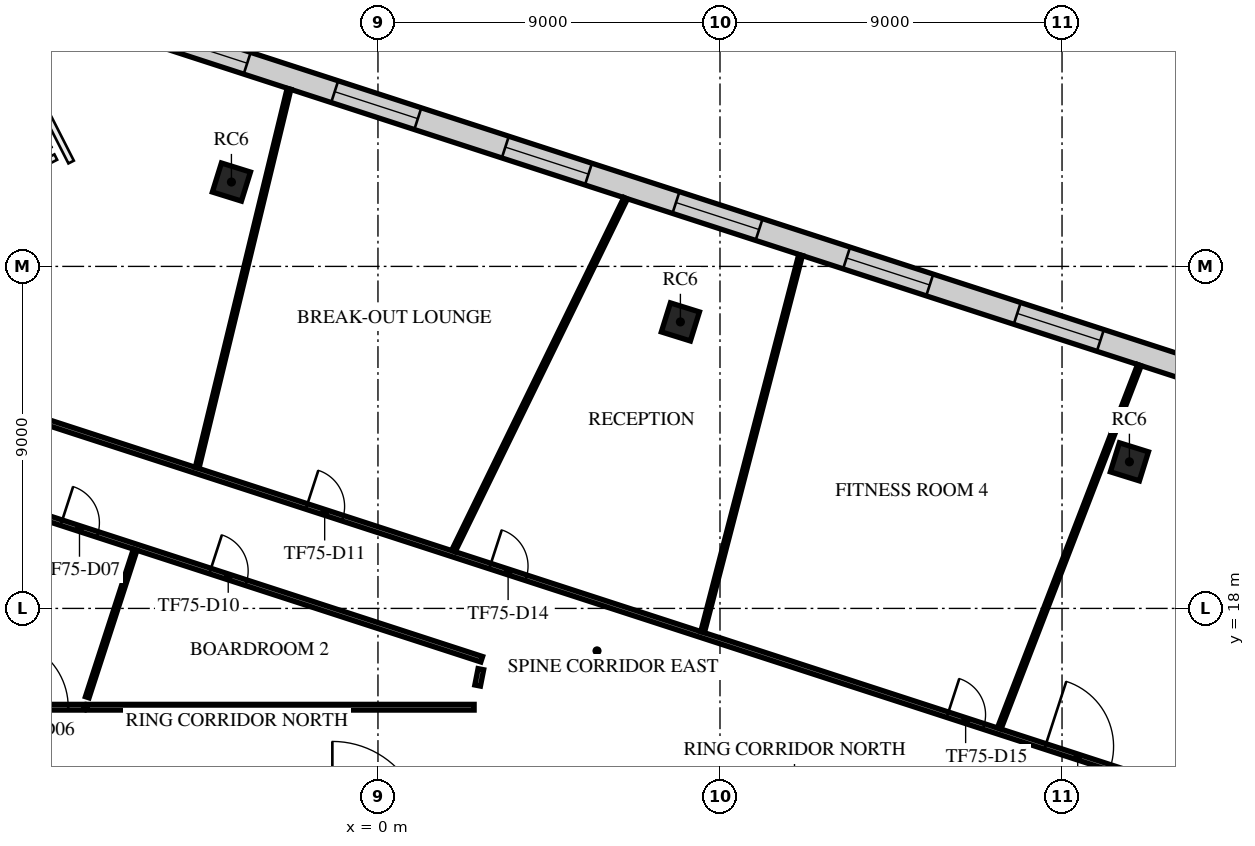
"""IFC4 building model, lengths in metres.
Left out: names, types, materials, properties, quantities, classifications, styles, units other than length and angle.
Written with IfcOpenShell. Run it as: python <this file> out.ifc"""

import sys

from ifc_helpers import new_model, si_unit, direction, frame, frame_2d, origin, origin_2d, place, context, subcontext, project, spatial, rectangle, extrude, element, fill, save


model = new_model("IFC4")
c1 = context("Model", 3, precision=1e-05, world=origin(), true_north=direction((0.0, 1.0)))
c2 = subcontext(c1, "Body", "Model", "MODEL_VIEW")
j1 = project(units=[si_unit("LENGTHUNIT", "METRE"), si_unit("PLANEANGLEUNIT", "RADIAN")], contexts=[c1])
p1 = place(None, origin())
s1 = spatial("IfcSite", under=j1, at=p1, CompositionType="ELEMENT")
p2 = place(p1, origin())
s2 = spatial("IfcBuilding", under=s1, at=p2, CompositionType="ELEMENT")
p3 = place(p2, frame((0.0, 0.0, 316.5)))
s3 = spatial("IfcBuildingStorey", under=s2, at=p3, CompositionType="ELEMENT", Elevation=316.5)
for number, where, z_axis, x_axis in (
    (1, (19.773, 21.857, 0.0), (0.0, 0.0, 1.0), (0.298, 0.955, 0.0)),
    (2, (7.958, 25.539, 0.0), (0.0, 0.0, 1.0), (0.298, 0.955, 0.0)),
    (3, (-3.856, 29.22, 0.0), (0.0, 0.0, 1.0), (0.298, 0.955, 0.0)),
):
    element("IfcColumn", number, at=place(p3, frame(where, z_axis=z_axis, x_axis=x_axis)), inside=s3, PredefinedType="COLUMN", context=c2, shape_type="SweptSolid", body=[
        extrude(rectangle(XDim=0.8, YDim=0.8, at=origin_2d()), origin(), (0.0, 0.0, 1.0), 4.0),
    ])
p4 = place(p3, frame((17.98, -31.066, 0.0), z_axis=(0.0, 0.0, 1.0), x_axis=(0.30901795675, 0.9510562036, 0.0)))
e4 = element("IfcWall", 4, at=p4, inside=s3, PredefinedType="STANDARD", context=c2, shape_type="SweptSolid", body=[
    extrude(rectangle(XDim=47.979, YDim=0.6, at=frame_2d((23.99, 0.0))), origin(), (0.0, 0.0, 1.0), 3.65),
])
p5 = place(p4, frame((1.231, 0.0, 0.9)))
e5 = element("IfcOpeningElement", 5, at=p5, cuts=e4, PredefinedType="OPENING", context=c2, shape_type="SweptSolid", body=[
    extrude(rectangle(XDim=1.9, YDim=2.1, at=frame_2d((0.95, 1.05))), frame((0.0, 0.31, 0.0), z_axis=(0.0, -1.0, 0.0), x_axis=(1.0, 0.0, 0.0)), (0.0, 0.0, 1.0), 0.62),
])
p6 = place(p4, frame((5.593, 0.0, 0.9)))
e6 = element("IfcOpeningElement", 6, at=p6, cuts=e4, PredefinedType="OPENING", context=c2, shape_type="SweptSolid", body=[
    extrude(rectangle(XDim=1.9, YDim=2.1, at=frame_2d((0.95, 1.05))), frame((0.0, 0.31, 0.0), z_axis=(0.0, -1.0, 0.0), x_axis=(1.0, 0.0, 0.0)), (0.0, 0.0, 1.0), 0.62),
])
p7 = place(p4, frame((9.954, 0.0, 0.9)))
e7 = element("IfcOpeningElement", 7, at=p7, cuts=e4, PredefinedType="OPENING", context=c2, shape_type="SweptSolid", body=[
    extrude(rectangle(XDim=1.9, YDim=2.1, at=frame_2d((0.95, 1.05))), frame((0.0, 0.31, 0.0), z_axis=(0.0, -1.0, 0.0), x_axis=(1.0, 0.0, 0.0)), (0.0, 0.0, 1.0), 0.62),
])
p8 = place(p4, frame((14.316, 0.0, 0.9)))
e8 = element("IfcOpeningElement", 8, at=p8, cuts=e4, PredefinedType="OPENING", context=c2, shape_type="SweptSolid", body=[
    extrude(rectangle(XDim=1.9, YDim=2.1, at=frame_2d((0.95, 1.05))), frame((0.0, 0.31, 0.0), z_axis=(0.0, -1.0, 0.0), x_axis=(1.0, 0.0, 0.0)), (0.0, 0.0, 1.0), 0.62),
])
p9 = place(p4, frame((18.678, 0.0, 0.9)))
e9 = element("IfcOpeningElement", 9, at=p9, cuts=e4, PredefinedType="OPENING", context=c2, shape_type="SweptSolid", body=[
    extrude(rectangle(XDim=1.9, YDim=2.1, at=frame_2d((0.95, 1.05))), frame((0.0, 0.31, 0.0), z_axis=(0.0, -1.0, 0.0), x_axis=(1.0, 0.0, 0.0)), (0.0, 0.0, 1.0), 0.62),
])
p10 = place(p4, frame((23.04, 0.0, 0.9)))
e10 = element("IfcOpeningElement", 10, at=p10, cuts=e4, PredefinedType="OPENING", context=c2, shape_type="SweptSolid", body=[
    extrude(rectangle(XDim=1.9, YDim=2.1, at=frame_2d((0.95, 1.05))), frame((0.0, 0.31, 0.0), z_axis=(0.0, -1.0, 0.0), x_axis=(1.0, 0.0, 0.0)), (0.0, 0.0, 1.0), 0.62),
])
p11 = place(p4, frame((27.401, 0.0, 0.9)))
e11 = element("IfcOpeningElement", 11, at=p11, cuts=e4, PredefinedType="OPENING", context=c2, shape_type="SweptSolid", body=[
    extrude(rectangle(XDim=1.9, YDim=2.1, at=frame_2d((0.95, 1.05))), frame((0.0, 0.31, 0.0), z_axis=(0.0, -1.0, 0.0), x_axis=(1.0, 0.0, 0.0)), (0.0, 0.0, 1.0), 0.62),
])
p12 = place(p4, frame((31.763, 0.0, 0.9)))
e12 = element("IfcOpeningElement", 12, at=p12, cuts=e4, PredefinedType="OPENING", context=c2, shape_type="SweptSolid", body=[
    extrude(rectangle(XDim=1.9, YDim=2.1, at=frame_2d((0.95, 1.05))), frame((0.0, 0.31, 0.0), z_axis=(0.0, -1.0, 0.0), x_axis=(1.0, 0.0, 0.0)), (0.0, 0.0, 1.0), 0.62),
])
p13 = place(p4, frame((36.125, 0.0, 0.9)))
e13 = element("IfcOpeningElement", 13, at=p13, cuts=e4, PredefinedType="OPENING", context=c2, shape_type="SweptSolid", body=[
    extrude(rectangle(XDim=1.9, YDim=2.1, at=frame_2d((0.95, 1.05))), frame((0.0, 0.31, 0.0), z_axis=(0.0, -1.0, 0.0), x_axis=(1.0, 0.0, 0.0)), (0.0, 0.0, 1.0), 0.62),
])
p14 = place(p4, frame((40.487, 0.0, 0.9)))
e14 = element("IfcOpeningElement", 14, at=p14, cuts=e4, PredefinedType="OPENING", context=c2, shape_type="SweptSolid", body=[
    extrude(rectangle(XDim=1.9, YDim=2.1, at=frame_2d((0.95, 1.05))), frame((0.0, 0.31, 0.0), z_axis=(0.0, -1.0, 0.0), x_axis=(1.0, 0.0, 0.0)), (0.0, 0.0, 1.0), 0.62),
])
p15 = place(p4, frame((44.848, 0.0, 0.9)))
e15 = element("IfcOpeningElement", 15, at=p15, cuts=e4, PredefinedType="OPENING", context=c2, shape_type="SweptSolid", body=[
    extrude(rectangle(XDim=1.9, YDim=2.1, at=frame_2d((0.95, 1.05))), frame((0.0, 0.31, 0.0), z_axis=(0.0, -1.0, 0.0), x_axis=(1.0, 0.0, 0.0)), (0.0, 0.0, 1.0), 0.62),
])
p16 = place(p3, frame((29.14, 21.76, 0.0), z_axis=(0.0, 0.0, 1.0), x_axis=(-0.951057712071, 0.309013314132, 0.0)))
e16 = element("IfcWall", 16, at=p16, inside=s3, PredefinedType="STANDARD", context=c2, shape_type="SweptSolid", body=[
    extrude(rectangle(XDim=42.49, YDim=0.6, at=frame_2d((21.245, 0.0))), origin(), (0.0, 0.0, 1.0), 3.65),
])
p17 = place(p16, frame((1.21, 0.0, 0.9)))
e17 = element("IfcOpeningElement", 17, at=p17, cuts=e16, PredefinedType="OPENING", context=c2, shape_type="SweptSolid", body=[
    extrude(rectangle(XDim=2.3, YDim=2.1, at=frame_2d((1.15, 1.05))), frame((0.0, 0.31, 0.0), z_axis=(0.0, -1.0, 0.0), x_axis=(1.0, 0.0, 0.0)), (0.0, 0.0, 1.0), 0.62),
])
p18 = place(p16, frame((5.932, 0.0, 0.9)))
e18 = element("IfcOpeningElement", 18, at=p18, cuts=e16, PredefinedType="OPENING", context=c2, shape_type="SweptSolid", body=[
    extrude(rectangle(XDim=2.3, YDim=2.1, at=frame_2d((1.15, 1.05))), frame((0.0, 0.31, 0.0), z_axis=(0.0, -1.0, 0.0), x_axis=(1.0, 0.0, 0.0)), (0.0, 0.0, 1.0), 0.62),
])
p19 = place(p16, frame((10.653, 0.0, 0.9)))
e19 = element("IfcOpeningElement", 19, at=p19, cuts=e16, PredefinedType="OPENING", context=c2, shape_type="SweptSolid", body=[
    extrude(rectangle(XDim=2.3, YDim=2.1, at=frame_2d((1.15, 1.05))), frame((0.0, 0.31, 0.0), z_axis=(0.0, -1.0, 0.0), x_axis=(1.0, 0.0, 0.0)), (0.0, 0.0, 1.0), 0.62),
])
p20 = place(p16, frame((15.374, 0.0, 0.9)))
e20 = element("IfcOpeningElement", 20, at=p20, cuts=e16, PredefinedType="OPENING", context=c2, shape_type="SweptSolid", body=[
    extrude(rectangle(XDim=2.3, YDim=2.1, at=frame_2d((1.15, 1.05))), frame((0.0, 0.31, 0.0), z_axis=(0.0, -1.0, 0.0), x_axis=(1.0, 0.0, 0.0)), (0.0, 0.0, 1.0), 0.62),
])
p21 = place(p16, frame((20.095, 0.0, 0.9)))
e21 = element("IfcOpeningElement", 21, at=p21, cuts=e16, PredefinedType="OPENING", context=c2, shape_type="SweptSolid", body=[
    extrude(rectangle(XDim=2.3, YDim=2.1, at=frame_2d((1.15, 1.05))), frame((0.0, 0.31, 0.0), z_axis=(0.0, -1.0, 0.0), x_axis=(1.0, 0.0, 0.0)), (0.0, 0.0, 1.0), 0.62),
])
p22 = place(p16, frame((24.816, 0.0, 0.9)))
e22 = element("IfcOpeningElement", 22, at=p22, cuts=e16, PredefinedType="OPENING", context=c2, shape_type="SweptSolid", body=[
    extrude(rectangle(XDim=2.3, YDim=2.1, at=frame_2d((1.15, 1.05))), frame((0.0, 0.31, 0.0), z_axis=(0.0, -1.0, 0.0), x_axis=(1.0, 0.0, 0.0)), (0.0, 0.0, 1.0), 0.62),
])
p23 = place(p16, frame((29.537, 0.0, 0.9)))
e23 = element("IfcOpeningElement", 23, at=p23, cuts=e16, PredefinedType="OPENING", context=c2, shape_type="SweptSolid", body=[
    extrude(rectangle(XDim=2.3, YDim=2.1, at=frame_2d((1.15, 1.05))), frame((0.0, 0.31, 0.0), z_axis=(0.0, -1.0, 0.0), x_axis=(1.0, 0.0, 0.0)), (0.0, 0.0, 1.0), 0.62),
])
p24 = place(p16, frame((34.258, 0.0, 0.9)))
e24 = element("IfcOpeningElement", 24, at=p24, cuts=e16, PredefinedType="OPENING", context=c2, shape_type="SweptSolid", body=[
    extrude(rectangle(XDim=2.3, YDim=2.1, at=frame_2d((1.15, 1.05))), frame((0.0, 0.31, 0.0), z_axis=(0.0, -1.0, 0.0), x_axis=(1.0, 0.0, 0.0)), (0.0, 0.0, 1.0), 0.62),
])
p25 = place(p16, frame((38.979, 0.0, 0.9)))
e25 = element("IfcOpeningElement", 25, at=p25, cuts=e16, PredefinedType="OPENING", context=c2, shape_type="SweptSolid", body=[
    extrude(rectangle(XDim=2.3, YDim=2.1, at=frame_2d((1.15, 1.05))), frame((0.0, 0.31, 0.0), z_axis=(0.0, -1.0, 0.0), x_axis=(1.0, 0.0, 0.0)), (0.0, 0.0, 1.0), 0.62),
])
p26 = place(p3, frame((-14.25, 15.4, 0.0), z_axis=(0.0, 0.0, 1.0), x_axis=(1.0, 0.0, 0.0)))
e26 = element("IfcWall", 26, at=p26, inside=s3, PredefinedType="PARTITIONING", context=c2, shape_type="SweptSolid", body=[
    extrude(rectangle(XDim=6.515, YDim=0.15, at=frame_2d((3.258, 0.0))), origin(), (0.0, 0.0, 1.0), 3.25),
])
p27 = place(p26, frame((4.3, 0.0, 0.0)))
e27 = element("IfcOpeningElement", 27, at=p27, cuts=e26, PredefinedType="OPENING", context=c2, shape_type="SweptSolid", body=[
    extrude(rectangle(XDim=1.8, YDim=2.1, at=frame_2d((0.9, 1.05))), frame((0.0, 0.085, 0.0), z_axis=(0.0, -1.0, 0.0), x_axis=(1.0, 0.0, 0.0)), (0.0, 0.0, 1.0), 0.17),
])
p28 = place(p3, frame((-11.706, 21.352, 0.0), z_axis=(0.0, 0.0, 1.0), x_axis=(0.951071532065, -0.308970776767, 0.0)))
e28 = element("IfcWall", 28, at=p28, inside=s3, PredefinedType="PARTITIONING", context=c2, shape_type="SweptSolid", body=[
    extrude(rectangle(XDim=15.178, YDim=0.15, at=frame_2d((7.589, 0.0))), origin(), (0.0, 0.0, 1.0), 3.25),
])
p29 = place(p28, frame((3.55, 0.0, 0.0)))
e29 = element("IfcOpeningElement", 29, at=p29, cuts=e28, PredefinedType="OPENING", context=c2, shape_type="SweptSolid", body=[
    extrude(rectangle(XDim=1.0, YDim=2.1, at=frame_2d((0.5, 1.05))), frame((0.0, 0.085, 0.0), z_axis=(0.0, -1.0, 0.0), x_axis=(1.0, 0.0, 0.0)), (0.0, 0.0, 1.0), 0.17),
])
p30 = place(p28, frame((7.665, 0.0, 0.0)))
e30 = element("IfcOpeningElement", 30, at=p30, cuts=e28, PredefinedType="OPENING", context=c2, shape_type="SweptSolid", body=[
    extrude(rectangle(XDim=1.0, YDim=2.1, at=frame_2d((0.5, 1.05))), frame((0.0, 0.085, 0.0), z_axis=(0.0, -1.0, 0.0), x_axis=(1.0, 0.0, 0.0)), (0.0, 0.0, 1.0), 0.17),
])
p31 = place(p3, frame((-10.964, 23.635, 0.0), z_axis=(0.0, 0.0, 1.0), x_axis=(0.951055018443, -0.309021604252, 0.0)))
e31 = element("IfcWall", 31, at=p31, inside=s3, PredefinedType="PARTITIONING", context=c2, shape_type="SweptSolid", body=[
    extrude(rectangle(XDim=35.537, YDim=0.15, at=frame_2d((17.769, 0.0))), origin(), (0.0, 0.0, 1.0), 3.25),
])
p32 = place(p31, frame((9.554, 0.0, 0.0)))
e32 = element("IfcOpeningElement", 32, at=p32, cuts=e31, PredefinedType="OPENING", context=c2, shape_type="SweptSolid", body=[
    extrude(rectangle(XDim=1.0, YDim=2.1, at=frame_2d((0.5, 1.05))), frame((0.0, 0.085, 0.0), z_axis=(0.0, -1.0, 0.0), x_axis=(1.0, 0.0, 0.0)), (0.0, 0.0, 1.0), 0.17),
])
p33 = place(p31, frame((14.629, 0.0, 0.0)))
e33 = element("IfcOpeningElement", 33, at=p33, cuts=e31, PredefinedType="OPENING", context=c2, shape_type="SweptSolid", body=[
    extrude(rectangle(XDim=1.0, YDim=2.1, at=frame_2d((0.5, 1.05))), frame((0.0, 0.085, 0.0), z_axis=(0.0, -1.0, 0.0), x_axis=(1.0, 0.0, 0.0)), (0.0, 0.0, 1.0), 0.17),
])
p34 = place(p31, frame((27.287, 0.0, 0.0)))
e34 = element("IfcOpeningElement", 34, at=p34, cuts=e31, PredefinedType="OPENING", context=c2, shape_type="SweptSolid", body=[
    extrude(rectangle(XDim=1.0, YDim=2.1, at=frame_2d((0.5, 1.05))), frame((0.0, 0.085, 0.0), z_axis=(0.0, -1.0, 0.0), x_axis=(1.0, 0.0, 0.0)), (0.0, 0.0, 1.0), 0.17),
])
p35 = place(p31, frame((29.988, 0.0, 0.0)))
e35 = element("IfcOpeningElement", 35, at=p35, cuts=e31, PredefinedType="OPENING", context=c2, shape_type="SweptSolid", body=[
    extrude(rectangle(XDim=1.8, YDim=2.1, at=frame_2d((0.9, 1.05))), frame((0.0, 0.085, 0.0), z_axis=(0.0, -1.0, 0.0), x_axis=(1.0, 0.0, 0.0)), (0.0, 0.0, 1.0), 0.17),
])
p36 = place(p3, frame((-7.65, 15.4, 0.0), z_axis=(0.0, 0.0, 1.0), x_axis=(1.0, 0.0, 0.0)))
e36 = element("IfcWall", 36, at=p36, inside=s3, PredefinedType="PARTITIONING", context=c2, shape_type="SweptSolid", body=[
    extrude(rectangle(XDim=10.18, YDim=0.15, at=frame_2d((5.09, 0.0))), origin(), (0.0, 0.0, 1.0), 3.25),
])
p37 = place(p3, frame((2.708, 16.4, 0.0), z_axis=(0.0, 0.0, 1.0), x_axis=(-0.193004252624, -0.981197920131, 0.0)))
e37 = element("IfcWall", 37, at=p37, inside=s3, PredefinedType="PARTITIONING", context=c2, shape_type="SweptSolid", body=[
    extrude(rectangle(XDim=0.438, YDim=0.15, at=frame_2d((0.219, 0.0))), origin(), (0.0, 0.0, 1.0), 3.25),
])
p38 = place(p3, frame((-7.65, 15.662, 0.0), z_axis=(0.0, 0.0, 1.0), x_axis=(0.308990083735, 0.951065259671, 0.0)))
e38 = element("IfcWall", 38, at=p38, inside=s3, PredefinedType="PARTITIONING", context=c2, shape_type="SweptSolid", body=[
    extrude(rectangle(XDim=4.083, YDim=0.1, at=frame_2d((2.042, 0.0))), origin(), (0.0, 0.0, 1.0), 3.25),
])
p39 = place(p3, frame((-4.757, 21.701, 0.0), z_axis=(0.0, 0.0, 1.0), x_axis=(0.235614328577, 0.971846638194, 0.0)))
e39 = element("IfcWall", 39, at=p39, inside=s3, PredefinedType="PARTITIONING", context=c2, shape_type="SweptSolid", body=[
    extrude(rectangle(XDim=10.259, YDim=0.1, at=frame_2d((5.13, 0.0))), origin(), (0.0, 0.0, 1.0), 3.05),
])
p40 = place(p3, frame((1.987, 19.513, 0.0), z_axis=(0.0, 0.0, 1.0), x_axis=(0.438663040854, 0.898651621369, 0.0)))
e40 = element("IfcWall", 40, at=p40, inside=s3, PredefinedType="PARTITIONING", context=c2, shape_type="SweptSolid", body=[
    extrude(rectangle(XDim=10.326, YDim=0.1, at=frame_2d((5.163, 0.0))), origin(), (0.0, 0.0, 1.0), 3.05),
])
p41 = place(p3, frame((8.543, 17.379, 0.0), z_axis=(0.0, 0.0, 1.0), x_axis=(0.251516032517, 0.967853132137, 0.0)))
e41 = element("IfcWall", 41, at=p41, inside=s3, PredefinedType="PARTITIONING", context=c2, shape_type="SweptSolid", body=[
    extrude(rectangle(XDim=10.248, YDim=0.1, at=frame_2d((5.124, 0.0))), origin(), (0.0, 0.0, 1.0), 3.05),
])
p42 = place(p3, frame((16.348, 14.843, 0.0), z_axis=(0.0, 0.0, 1.0), x_axis=(0.360002455437, 0.932951355687, 0.0)))
e42 = element("IfcWall", 42, at=p42, inside=s3, PredefinedType="PARTITIONING", context=c2, shape_type="SweptSolid", body=[
    extrude(rectangle(XDim=10.245, YDim=0.1, at=frame_2d((5.123, 0.0))), origin(), (0.0, 0.0, 1.0), 3.05),
])
p43 = place(p19, origin())
e43 = element("IfcWindow", 43, at=p43, inside=s3, PartitioningType="SINGLE_PANEL", PredefinedType="WINDOW", context=c2, shape_type="SweptSolid", body=[
    extrude(rectangle(XDim=2.3, YDim=2.1, at=frame_2d((1.15, 1.05))), frame((0.0, 0.03, 0.0), z_axis=(0.0, -1.0, 0.0), x_axis=(1.0, 0.0, 0.0)), (0.0, 0.0, 1.0), 0.06),
])
fill(e19, e43)
p44 = place(p20, origin())
e44 = element("IfcWindow", 44, at=p44, inside=s3, PartitioningType="SINGLE_PANEL", PredefinedType="WINDOW", context=c2, shape_type="SweptSolid", body=[
    extrude(rectangle(XDim=2.3, YDim=2.1, at=frame_2d((1.15, 1.05))), frame((0.0, 0.03, 0.0), z_axis=(0.0, -1.0, 0.0), x_axis=(1.0, 0.0, 0.0)), (0.0, 0.0, 1.0), 0.06),
])
fill(e20, e44)
p45 = place(p21, origin())
e45 = element("IfcWindow", 45, at=p45, inside=s3, PartitioningType="SINGLE_PANEL", PredefinedType="WINDOW", context=c2, shape_type="SweptSolid", body=[
    extrude(rectangle(XDim=2.3, YDim=2.1, at=frame_2d((1.15, 1.05))), frame((0.0, 0.03, 0.0), z_axis=(0.0, -1.0, 0.0), x_axis=(1.0, 0.0, 0.0)), (0.0, 0.0, 1.0), 0.06),
])
fill(e21, e45)
p46 = place(p22, origin())
e46 = element("IfcWindow", 46, at=p46, inside=s3, PartitioningType="SINGLE_PANEL", PredefinedType="WINDOW", context=c2, shape_type="SweptSolid", body=[
    extrude(rectangle(XDim=2.3, YDim=2.1, at=frame_2d((1.15, 1.05))), frame((0.0, 0.03, 0.0), z_axis=(0.0, -1.0, 0.0), x_axis=(1.0, 0.0, 0.0)), (0.0, 0.0, 1.0), 0.06),
])
fill(e22, e46)
p47 = place(p23, origin())
e47 = element("IfcWindow", 47, at=p47, inside=s3, PartitioningType="SINGLE_PANEL", PredefinedType="WINDOW", context=c2, shape_type="SweptSolid", body=[
    extrude(rectangle(XDim=2.3, YDim=2.1, at=frame_2d((1.15, 1.05))), frame((0.0, 0.03, 0.0), z_axis=(0.0, -1.0, 0.0), x_axis=(1.0, 0.0, 0.0)), (0.0, 0.0, 1.0), 0.06),
])
fill(e23, e47)
p48 = place(p24, origin())
e48 = element("IfcWindow", 48, at=p48, inside=s3, PartitioningType="SINGLE_PANEL", PredefinedType="WINDOW", context=c2, shape_type="SweptSolid", body=[
    extrude(rectangle(XDim=2.3, YDim=2.1, at=frame_2d((1.15, 1.05))), frame((0.0, 0.03, 0.0), z_axis=(0.0, -1.0, 0.0), x_axis=(1.0, 0.0, 0.0)), (0.0, 0.0, 1.0), 0.06),
])
fill(e24, e48)
p49 = place(p27, origin())
e49 = element("IfcDoor", 49, at=p49, inside=s3, OperationType="DOUBLE_DOOR_SINGLE_SWING", PredefinedType="DOOR", context=c2, shape_type="SweptSolid", body=[
    extrude(rectangle(XDim=1.8, YDim=2.1, at=frame_2d((0.9, 1.05))), frame((0.0, 0.025, 0.0), z_axis=(0.0, -1.0, 0.0), x_axis=(1.0, 0.0, 0.0)), (0.0, 0.0, 1.0), 0.05),
])
fill(e27, e49)
p50 = place(p29, frame((1.0, 0.0, 0.0), z_axis=(0.0, 0.0, 1.0), x_axis=(-1.0, 0.0, 0.0)))
e50 = element("IfcDoor", 50, at=p50, inside=s3, OperationType="SINGLE_SWING_RIGHT", PredefinedType="DOOR", context=c2, shape_type="SweptSolid", body=[
    extrude(rectangle(XDim=1.0, YDim=2.1, at=frame_2d((0.5, 1.05))), frame((0.0, 0.025, 0.0), z_axis=(0.0, -1.0, 0.0), x_axis=(1.0, 0.0, 0.0)), (0.0, 0.0, 1.0), 0.05),
])
fill(e29, e50)
p51 = place(p30, frame((1.0, 0.0, 0.0), z_axis=(0.0, 0.0, 1.0), x_axis=(-1.0, 0.0, 0.0)))
e51 = element("IfcDoor", 51, at=p51, inside=s3, OperationType="SINGLE_SWING_RIGHT", PredefinedType="DOOR", context=c2, shape_type="SweptSolid", body=[
    extrude(rectangle(XDim=1.0, YDim=2.1, at=frame_2d((0.5, 1.05))), frame((0.0, 0.025, 0.0), z_axis=(0.0, -1.0, 0.0), x_axis=(1.0, 0.0, 0.0)), (0.0, 0.0, 1.0), 0.05),
])
fill(e30, e51)
p52 = place(p32, origin())
e52 = element("IfcDoor", 52, at=p52, inside=s3, OperationType="SINGLE_SWING_RIGHT", PredefinedType="DOOR", context=c2, shape_type="SweptSolid", body=[
    extrude(rectangle(XDim=1.0, YDim=2.1, at=frame_2d((0.5, 1.05))), frame((0.0, 0.025, 0.0), z_axis=(0.0, -1.0, 0.0), x_axis=(1.0, 0.0, 0.0)), (0.0, 0.0, 1.0), 0.05),
])
fill(e32, e52)
p53 = place(p33, origin())
e53 = element("IfcDoor", 53, at=p53, inside=s3, OperationType="SINGLE_SWING_LEFT", PredefinedType="DOOR", context=c2, shape_type="SweptSolid", body=[
    extrude(rectangle(XDim=1.0, YDim=2.1, at=frame_2d((0.5, 1.05))), frame((0.0, 0.025, 0.0), z_axis=(0.0, -1.0, 0.0), x_axis=(1.0, 0.0, 0.0)), (0.0, 0.0, 1.0), 0.05),
])
fill(e33, e53)
p54 = place(p34, origin())
e54 = element("IfcDoor", 54, at=p54, inside=s3, OperationType="SINGLE_SWING_LEFT", PredefinedType="DOOR", context=c2, shape_type="SweptSolid", body=[
    extrude(rectangle(XDim=1.0, YDim=2.1, at=frame_2d((0.5, 1.05))), frame((0.0, 0.025, 0.0), z_axis=(0.0, -1.0, 0.0), x_axis=(1.0, 0.0, 0.0)), (0.0, 0.0, 1.0), 0.05),
])
fill(e34, e54)
p55 = place(p35, origin())
e55 = element("IfcDoor", 55, at=p55, inside=s3, OperationType="DOUBLE_DOOR_SINGLE_SWING", PredefinedType="DOOR", context=c2, shape_type="SweptSolid", body=[
    extrude(rectangle(XDim=1.8, YDim=2.1, at=frame_2d((0.9, 1.05))), frame((0.0, 0.025, 0.0), z_axis=(0.0, -1.0, 0.0), x_axis=(1.0, 0.0, 0.0)), (0.0, 0.0, 1.0), 0.05),
])
fill(e35, e55)
save(model, sys.argv[1])
